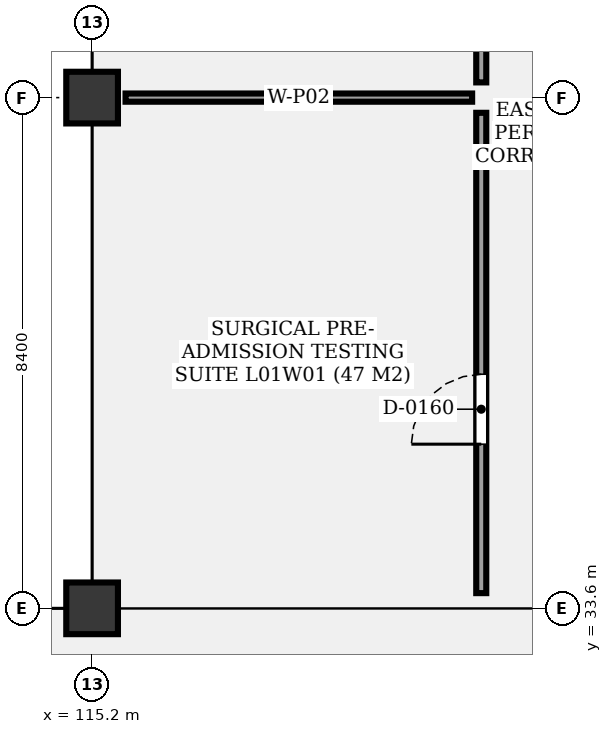
"""IFC4 building model, lengths in metres.
Left out: names, types, materials, properties, quantities, classifications, styles, units other than length and angle.
Written with IfcOpenShell. Run it as: python <this file> out.ifc"""

import sys

from ifc_helpers import new_model, si_unit, direction, frame, frame_2d, origin, origin_2d, place, context, subcontext, project, spatial, rectangle, extrude, element, fill, save


model = new_model("IFC4")
c1 = context("Model", 3, precision=1e-05, world=origin(), true_north=direction((0.0, 1.0)))
c2 = subcontext(c1, "Body", "Model", "MODEL_VIEW")
j1 = project(units=[si_unit("LENGTHUNIT", "METRE"), si_unit("PLANEANGLEUNIT", "RADIAN")], contexts=[c1])
p1 = place(None, origin())
s1 = spatial("IfcSite", under=j1, at=p1, CompositionType="ELEMENT")
p2 = place(p1, origin())
s2 = spatial("IfcBuilding", under=s1, at=p2, CompositionType="ELEMENT")
p3 = place(p2, frame((0.0, 0.0, 5.1)))
s3 = spatial("IfcBuildingStorey", under=s2, at=p3, CompositionType="ELEMENT", Elevation=5.1)
for number, where, z_axis, x_axis in (
    (1, (115.2, 33.6, 0.0), (0.0, 0.0, 1.0), (1.0, 0.0, 0.0)),
    (2, (115.2, 42.0, 0.0), (0.0, 0.0, 1.0), (1.0, 0.0, 0.0)),
):
    element("IfcColumn", number, at=place(p3, frame(where, z_axis=z_axis, x_axis=x_axis)), inside=s3, PredefinedType="COLUMN", context=c2, shape_type="SweptSolid", body=[
        extrude(rectangle(XDim=0.85, YDim=0.85, at=origin_2d()), origin(), (0.0, 0.0, 1.0), 4.8),
    ])
p4 = place(p3, frame((121.6, 33.85, 0.0), z_axis=(0.0, 0.0, 1.0), x_axis=(0.0, 1.0, 0.0)))
e3 = element("IfcWall", 3, at=p4, inside=s3, PredefinedType="PARTITIONING", context=c2, shape_type="SweptSolid", body=[
    extrude(rectangle(XDim=7.9, YDim=0.165, at=frame_2d((3.95, 0.0))), origin(), (0.0, 0.0, 1.0), 3.68),
])
p5 = place(p4, frame((2.45, 0.0, 0.0)))
e4 = element("IfcOpeningElement", 4, at=p5, cuts=e3, PredefinedType="OPENING", context=c2, shape_type="SweptSolid", body=[
    extrude(rectangle(XDim=1.15, YDim=2.2, at=frame_2d((0.575, 1.1))), frame((0.0, 0.093, 0.0), z_axis=(0.0, -1.0, 0.0), x_axis=(1.0, 0.0, 0.0)), (0.0, 0.0, 1.0), 0.185),
])
p6 = place(p3, frame((121.6, 42.25, 0.0), z_axis=(0.0, 0.0, 1.0), x_axis=(0.0, 1.0, 0.0)))
e5 = element("IfcWall", 5, at=p6, inside=s3, PredefinedType="PARTITIONING", context=c2, shape_type="SweptSolid", body=[
    extrude(rectangle(XDim=7.9, YDim=0.165, at=frame_2d((3.95, 0.0))), origin(), (0.0, 0.0, 1.0), 3.68),
])
p7 = place(p6, frame((2.45, 0.0, 0.0)))
e6 = element("IfcOpeningElement", 6, at=p7, cuts=e5, PredefinedType="OPENING", context=c2, shape_type="SweptSolid", body=[
    extrude(rectangle(XDim=1.05, YDim=2.1, at=frame_2d((0.525, 1.05))), frame((0.0, 0.093, 0.0), z_axis=(0.0, -1.0, 0.0), x_axis=(1.0, 0.0, 0.0)), (0.0, 0.0, 1.0), 0.185),
])
p8 = place(p3, frame((115.75, 42.0, 0.0), z_axis=(0.0, 0.0, 1.0), x_axis=(1.0, 0.0, 0.0)))
e7 = element("IfcWall", 7, at=p8, inside=s3, PredefinedType="PARTITIONING", context=c2, shape_type="SweptSolid", body=[
    extrude(rectangle(XDim=5.7, YDim=0.135, at=frame_2d((2.85, 0.0))), origin(), (0.0, 0.0, 1.0), 3.68),
])
p9 = place(p5, origin())
e8 = element("IfcDoor", 8, at=p9, inside=s3, OperationType="SINGLE_SWING_LEFT", PredefinedType="DOOR", context=c2, shape_type="SweptSolid", body=[
    extrude(rectangle(XDim=1.15, YDim=2.2, at=frame_2d((0.575, 1.1))), frame((0.0, 0.025, 0.0), z_axis=(0.0, -1.0, 0.0), x_axis=(1.0, 0.0, 0.0)), (0.0, 0.0, 1.0), 0.05),
])
fill(e4, e8)
save(model, sys.argv[1])
